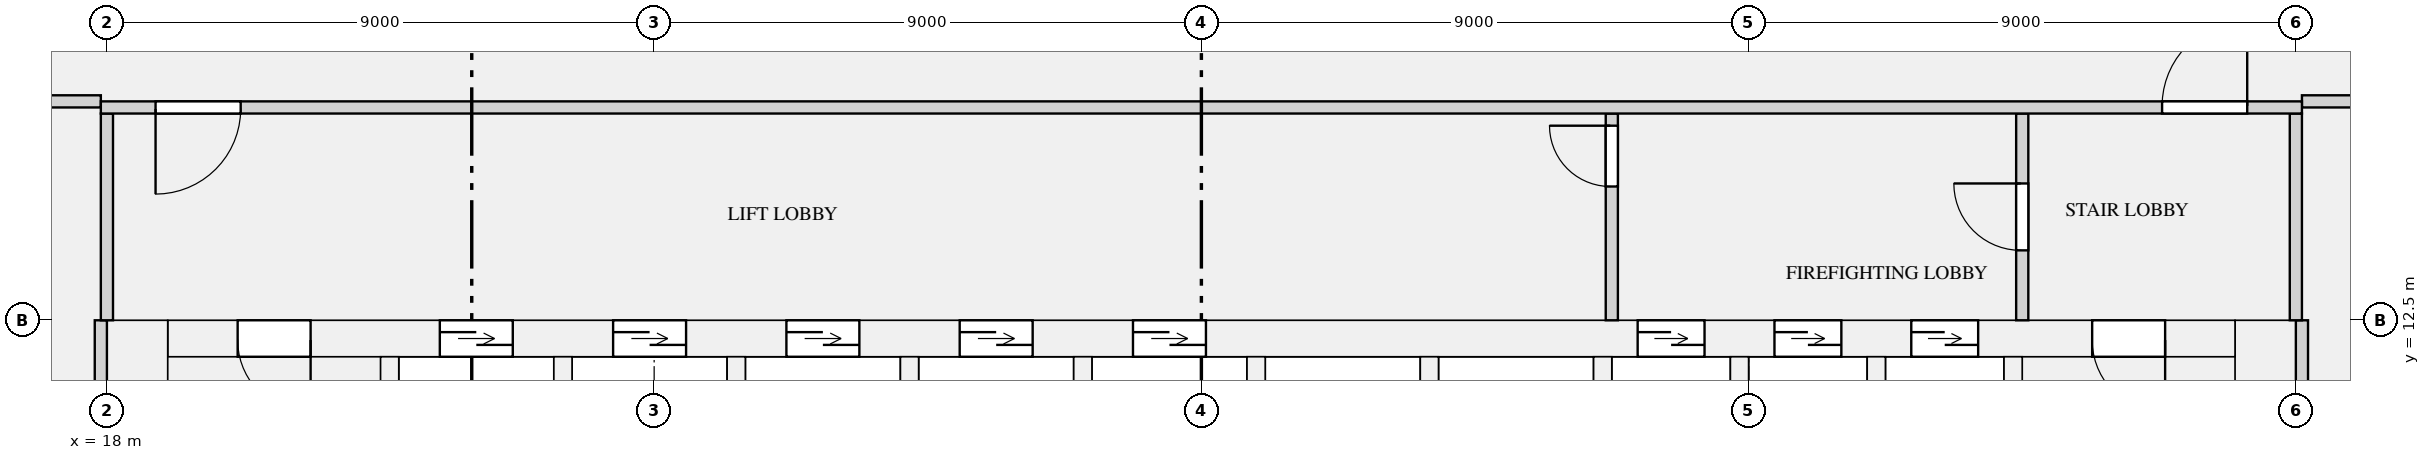
"""IFC4 building model, lengths in metres.
Left out: names, types, materials, properties, quantities, classifications, styles, units other than length and angle.
Written with IfcOpenShell. Run it as: python <this file> out.ifc"""

import sys

from ifc_helpers import new_model, si_unit, direction, frame, frame_2d, origin, place, context, subcontext, project, spatial, rectangle, extrude, element, fill, save


model = new_model("IFC4")
c1 = context("Model", 3, precision=1e-05, world=origin(), true_north=direction((0.0, 1.0)))
c2 = subcontext(c1, "Body", "Model", "MODEL_VIEW")
j1 = project(units=[si_unit("LENGTHUNIT", "METRE"), si_unit("PLANEANGLEUNIT", "RADIAN")], contexts=[c1])
p1 = place(None, origin())
s1 = spatial("IfcSite", under=j1, at=p1, CompositionType="ELEMENT")
p2 = place(p1, origin())
s2 = spatial("IfcBuilding", under=s1, at=p2, CompositionType="ELEMENT")
p3 = place(p2, frame((0.0, 0.0, 73.05)))
s3 = spatial("IfcBuildingStorey", under=s2, at=p3, CompositionType="ELEMENT", Elevation=73.05)
for number, where, z_axis, x_axis in (
    (1, (18.5, 0.0, 0.0), (0.0, 0.0, 1.0), (0.0, 1.0, 0.0)),
    (2, (53.5, 0.0, 0.0), (0.0, 0.0, 1.0), (0.0, 1.0, 0.0)),
):
    element("IfcWall", number, at=place(p3, frame(where, z_axis=z_axis, x_axis=x_axis)), inside=s3, PredefinedType="SHEAR", context=c2, shape_type="SweptSolid", body=[
        extrude(rectangle(XDim=12.5, YDim=1.0, at=frame_2d((6.25, 0.0))), origin(), (0.0, 0.0, 1.0), 4.2),
    ])
p4 = place(p3, frame((19.0, 12.2, 0.0), z_axis=(0.0, 0.0, 1.0), x_axis=(1.0, 0.0, 0.0)))
e3 = element("IfcWall", 3, at=p4, inside=s3, PredefinedType="SHEAR", context=c2, shape_type="SweptSolid", body=[
    extrude(rectangle(XDim=34.0, YDim=0.6, at=frame_2d((17.0, 0.0))), origin(), (0.0, 0.0, 1.0), 4.2),
])
p5 = place(p4, frame((4.475, 0.0, 0.0)))
e4 = element("IfcOpeningElement", 4, at=p5, cuts=e3, PredefinedType="OPENING", context=c2, shape_type="SweptSolid", body=[
    extrude(rectangle(XDim=1.2, YDim=2.1, at=frame_2d((0.6, 1.05))), frame((0.0, 0.31, 0.0), z_axis=(0.0, -1.0, 0.0), x_axis=(1.0, 0.0, 0.0)), (0.0, 0.0, 1.0), 0.62),
])
p6 = place(p4, frame((7.325, 0.0, 0.0)))
e5 = element("IfcOpeningElement", 5, at=p6, cuts=e3, PredefinedType="OPENING", context=c2, shape_type="SweptSolid", body=[
    extrude(rectangle(XDim=1.2, YDim=2.1, at=frame_2d((0.6, 1.05))), frame((0.0, 0.31, 0.0), z_axis=(0.0, -1.0, 0.0), x_axis=(1.0, 0.0, 0.0)), (0.0, 0.0, 1.0), 0.62),
])
p7 = place(p4, frame((10.175, 0.0, 0.0)))
e6 = element("IfcOpeningElement", 6, at=p7, cuts=e3, PredefinedType="OPENING", context=c2, shape_type="SweptSolid", body=[
    extrude(rectangle(XDim=1.2, YDim=2.1, at=frame_2d((0.6, 1.05))), frame((0.0, 0.31, 0.0), z_axis=(0.0, -1.0, 0.0), x_axis=(1.0, 0.0, 0.0)), (0.0, 0.0, 1.0), 0.62),
])
p8 = place(p4, frame((13.025, 0.0, 0.0)))
e7 = element("IfcOpeningElement", 7, at=p8, cuts=e3, PredefinedType="OPENING", context=c2, shape_type="SweptSolid", body=[
    extrude(rectangle(XDim=1.2, YDim=2.1, at=frame_2d((0.6, 1.05))), frame((0.0, 0.31, 0.0), z_axis=(0.0, -1.0, 0.0), x_axis=(1.0, 0.0, 0.0)), (0.0, 0.0, 1.0), 0.62),
])
p9 = place(p4, frame((15.875, 0.0, 0.0)))
e8 = element("IfcOpeningElement", 8, at=p9, cuts=e3, PredefinedType="OPENING", context=c2, shape_type="SweptSolid", body=[
    extrude(rectangle(XDim=1.2, YDim=2.1, at=frame_2d((0.6, 1.05))), frame((0.0, 0.31, 0.0), z_axis=(0.0, -1.0, 0.0), x_axis=(1.0, 0.0, 0.0)), (0.0, 0.0, 1.0), 0.62),
])
p10 = place(p4, frame((24.175, 0.0, 0.0)))
e9 = element("IfcOpeningElement", 9, at=p10, cuts=e3, PredefinedType="OPENING", context=c2, shape_type="SweptSolid", body=[
    extrude(rectangle(XDim=1.1, YDim=2.1, at=frame_2d((0.55, 1.05))), frame((0.0, 0.31, 0.0), z_axis=(0.0, -1.0, 0.0), x_axis=(1.0, 0.0, 0.0)), (0.0, 0.0, 1.0), 0.62),
])
p11 = place(p4, frame((26.425, 0.0, 0.0)))
e10 = element("IfcOpeningElement", 10, at=p11, cuts=e3, PredefinedType="OPENING", context=c2, shape_type="SweptSolid", body=[
    extrude(rectangle(XDim=1.1, YDim=2.1, at=frame_2d((0.55, 1.05))), frame((0.0, 0.31, 0.0), z_axis=(0.0, -1.0, 0.0), x_axis=(1.0, 0.0, 0.0)), (0.0, 0.0, 1.0), 0.62),
])
p12 = place(p4, frame((28.675, 0.0, 0.0)))
e11 = element("IfcOpeningElement", 11, at=p12, cuts=e3, PredefinedType="OPENING", context=c2, shape_type="SweptSolid", body=[
    extrude(rectangle(XDim=1.1, YDim=2.1, at=frame_2d((0.55, 1.05))), frame((0.0, 0.31, 0.0), z_axis=(0.0, -1.0, 0.0), x_axis=(1.0, 0.0, 0.0)), (0.0, 0.0, 1.0), 0.62),
])
p13 = place(p4, frame((1.15, 0.0, 0.0)))
e12 = element("IfcOpeningElement", 12, at=p13, cuts=e3, PredefinedType="OPENING", context=c2, shape_type="SweptSolid", body=[
    extrude(rectangle(XDim=1.2, YDim=2.1, at=frame_2d((0.6, 1.05))), frame((0.0, 0.31, 0.0), z_axis=(0.0, -1.0, 0.0), x_axis=(1.0, 0.0, 0.0)), (0.0, 0.0, 1.0), 0.62),
])
p14 = place(p4, frame((31.65, 0.0, 0.0)))
e13 = element("IfcOpeningElement", 13, at=p14, cuts=e3, PredefinedType="OPENING", context=c2, shape_type="SweptSolid", body=[
    extrude(rectangle(XDim=1.2, YDim=2.1, at=frame_2d((0.6, 1.05))), frame((0.0, 0.31, 0.0), z_axis=(0.0, -1.0, 0.0), x_axis=(1.0, 0.0, 0.0)), (0.0, 0.0, 1.0), 0.62),
])
for number, where, z_axis, x_axis in (
    (14, (22.65, 9.35, 0.0), (0.0, 0.0, 1.0), (0.0, 1.0, 0.0)),
    (15, (25.5, 9.35, 0.0), (0.0, 0.0, 1.0), (0.0, 1.0, 0.0)),
    (16, (28.35, 9.35, 0.0), (0.0, 0.0, 1.0), (0.0, 1.0, 0.0)),
    (17, (31.2, 9.35, 0.0), (0.0, 0.0, 1.0), (0.0, 1.0, 0.0)),
    (18, (34.05, 9.35, 0.0), (0.0, 0.0, 1.0), (0.0, 1.0, 0.0)),
    (19, (36.9, 9.35, 0.0), (0.0, 0.0, 1.0), (0.0, 1.0, 0.0)),
    (20, (39.75, 9.35, 0.0), (0.0, 0.0, 1.0), (0.0, 1.0, 0.0)),
):
    element("IfcWall", number, at=place(p3, frame(where, z_axis=z_axis, x_axis=x_axis)), inside=s3, PredefinedType="SHEAR", context=c2, shape_type="SweptSolid", body=[
        extrude(rectangle(XDim=2.55, YDim=0.3, at=frame_2d((1.275, 0.0))), origin(), (0.0, 0.0, 1.0), 4.2),
    ])
for number, where, z_axis, x_axis in (
    (21, (42.6, 8.25, 0.0), (0.0, 0.0, 1.0), (0.0, 1.0, 0.0)),
    (22, (44.85, 8.25, 0.0), (0.0, 0.0, 1.0), (0.0, 1.0, 0.0)),
    (23, (47.1, 8.25, 0.0), (0.0, 0.0, 1.0), (0.0, 1.0, 0.0)),
    (24, (49.35, 8.25, 0.0), (0.0, 0.0, 1.0), (0.0, 1.0, 0.0)),
):
    element("IfcWall", number, at=place(p3, frame(where, z_axis=z_axis, x_axis=x_axis)), inside=s3, PredefinedType="SHEAR", context=c2, shape_type="SweptSolid", body=[
        extrude(rectangle(XDim=3.65, YDim=0.3, at=frame_2d((1.825, 0.0))), origin(), (0.0, 0.0, 1.0), 4.2),
    ])
p15 = place(p3, frame((18.0, 12.5, 0.0), z_axis=(0.0, 0.0, 1.0), x_axis=(0.0, 1.0, 0.0)))
e25 = element("IfcWall", 25, at=p15, inside=s3, PredefinedType="PARTITIONING", context=c2, shape_type="SweptSolid", body=[
    extrude(rectangle(XDim=3.4, YDim=0.2, at=frame_2d((1.7, 0.0))), origin(), (0.0, 0.0, 1.0), 3.7),
])
p16 = place(p3, frame((42.75, 12.5, 0.0), z_axis=(0.0, 0.0, 1.0), x_axis=(0.0, 1.0, 0.0)))
e26 = element("IfcWall", 26, at=p16, inside=s3, PredefinedType="PARTITIONING", context=c2, shape_type="SweptSolid", body=[
    extrude(rectangle(XDim=3.4, YDim=0.2, at=frame_2d((1.7, 0.0))), origin(), (0.0, 0.0, 1.0), 3.7),
])
p17 = place(p16, frame((2.2, 0.0, 0.0)))
e27 = element("IfcOpeningElement", 27, at=p17, cuts=e26, PredefinedType="OPENING", context=c2, shape_type="SweptSolid", body=[
    extrude(rectangle(XDim=1.0, YDim=2.1, at=frame_2d((0.5, 1.05))), frame((0.0, 0.11, 0.0), z_axis=(0.0, -1.0, 0.0), x_axis=(1.0, 0.0, 0.0)), (0.0, 0.0, 1.0), 0.22),
])
p18 = place(p3, frame((49.5, 12.5, 0.0), z_axis=(0.0, 0.0, 1.0), x_axis=(0.0, 1.0, 0.0)))
e28 = element("IfcWall", 28, at=p18, inside=s3, PredefinedType="PARTITIONING", context=c2, shape_type="SweptSolid", body=[
    extrude(rectangle(XDim=3.4, YDim=0.2, at=frame_2d((1.7, 0.0))), origin(), (0.0, 0.0, 1.0), 3.7),
])
p19 = place(p18, frame((1.15, 0.0, 0.0)))
e29 = element("IfcOpeningElement", 29, at=p19, cuts=e28, PredefinedType="OPENING", context=c2, shape_type="SweptSolid", body=[
    extrude(rectangle(XDim=1.1, YDim=2.1, at=frame_2d((0.55, 1.05))), frame((0.0, 0.11, 0.0), z_axis=(0.0, -1.0, 0.0), x_axis=(1.0, 0.0, 0.0)), (0.0, 0.0, 1.0), 0.22),
])
p20 = place(p3, frame((54.0, 12.5, 0.0), z_axis=(0.0, 0.0, 1.0), x_axis=(0.0, 1.0, 0.0)))
e30 = element("IfcWall", 30, at=p20, inside=s3, PredefinedType="PARTITIONING", context=c2, shape_type="SweptSolid", body=[
    extrude(rectangle(XDim=3.4, YDim=0.2, at=frame_2d((1.7, 0.0))), origin(), (0.0, 0.0, 1.0), 3.7),
])
p21 = place(p3, frame((17.9, 16.0, 0.0), z_axis=(0.0, 0.0, 1.0), x_axis=(1.0, 0.0, 0.0)))
e31 = element("IfcWall", 31, at=p21, inside=s3, PredefinedType="PARTITIONING", context=c2, shape_type="SweptSolid", body=[
    extrude(rectangle(XDim=36.2, YDim=0.2, at=frame_2d((18.1, 0.0))), origin(), (0.0, 0.0, 1.0), 3.7),
])
p22 = place(p21, frame((0.9, 0.0, 0.0)))
e32 = element("IfcOpeningElement", 32, at=p22, cuts=e31, PredefinedType="OPENING", context=c2, shape_type="SweptSolid", body=[
    extrude(rectangle(XDim=1.4, YDim=2.1, at=frame_2d((0.7, 1.05))), frame((0.0, 0.11, 0.0), z_axis=(0.0, -1.0, 0.0), x_axis=(1.0, 0.0, 0.0)), (0.0, 0.0, 1.0), 0.22),
])
p23 = place(p21, frame((33.9, 0.0, 0.0)))
e33 = element("IfcOpeningElement", 33, at=p23, cuts=e31, PredefinedType="OPENING", context=c2, shape_type="SweptSolid", body=[
    extrude(rectangle(XDim=1.4, YDim=2.1, at=frame_2d((0.7, 1.05))), frame((0.0, 0.11, 0.0), z_axis=(0.0, -1.0, 0.0), x_axis=(1.0, 0.0, 0.0)), (0.0, 0.0, 1.0), 0.22),
])
p24 = place(p3, frame((5.592, 16.1, 0.0), z_axis=(0.0, 0.0, 1.0), x_axis=(1.0, 0.0, 0.0)))
e34 = element("IfcWall", 34, at=p24, inside=s3, PredefinedType="PARTITIONING", context=c2, shape_type="SweptSolid", body=[
    extrude(rectangle(XDim=12.308, YDim=0.2, at=frame_2d((6.154, 0.0))), origin(), (0.0, 0.0, 1.0), 3.7),
])
p25 = place(p24, frame((3.308, 0.0, 0.0)))
e35 = element("IfcOpeningElement", 35, at=p25, cuts=e34, PredefinedType="OPENING", context=c2, shape_type="SweptSolid", body=[
    extrude(rectangle(XDim=1.2, YDim=2.1, at=frame_2d((0.6, 1.05))), frame((0.0, 0.11, 0.0), z_axis=(0.0, -1.0, 0.0), x_axis=(1.0, 0.0, 0.0)), (0.0, 0.0, 1.0), 0.22),
])
p26 = place(p24, frame((7.708, 0.0, 0.0)))
e36 = element("IfcOpeningElement", 36, at=p26, cuts=e34, PredefinedType="OPENING", context=c2, shape_type="SweptSolid", body=[
    extrude(rectangle(XDim=1.8, YDim=2.1, at=frame_2d((0.9, 1.05))), frame((0.0, 0.11, 0.0), z_axis=(0.0, -1.0, 0.0), x_axis=(1.0, 0.0, 0.0)), (0.0, 0.0, 1.0), 0.22),
])
p27 = place(p3, frame((54.1, 16.1, 0.0), z_axis=(0.0, 0.0, 1.0), x_axis=(1.0, 0.0, 0.0)))
e37 = element("IfcWall", 37, at=p27, inside=s3, PredefinedType="PARTITIONING", context=c2, shape_type="SweptSolid", body=[
    extrude(rectangle(XDim=19.1, YDim=0.2, at=frame_2d((9.55, 0.0))), origin(), (0.0, 0.0, 1.0), 3.7),
])
p28 = place(p27, frame((3.8, 0.0, 0.0)))
e38 = element("IfcOpeningElement", 38, at=p28, cuts=e37, PredefinedType="OPENING", context=c2, shape_type="SweptSolid", body=[
    extrude(rectangle(XDim=1.8, YDim=2.1, at=frame_2d((0.9, 1.05))), frame((0.0, 0.11, 0.0), z_axis=(0.0, -1.0, 0.0), x_axis=(1.0, 0.0, 0.0)), (0.0, 0.0, 1.0), 0.22),
])
p29 = place(p27, frame((11.5, 0.0, 0.0)))
e39 = element("IfcOpeningElement", 39, at=p29, cuts=e37, PredefinedType="OPENING", context=c2, shape_type="SweptSolid", body=[
    extrude(rectangle(XDim=1.8, YDim=2.1, at=frame_2d((0.9, 1.05))), frame((0.0, 0.11, 0.0), z_axis=(0.0, -1.0, 0.0), x_axis=(1.0, 0.0, 0.0)), (0.0, 0.0, 1.0), 0.22),
])
p30 = place(p27, frame((16.35, 0.0, 0.0)))
e40 = element("IfcOpeningElement", 40, at=p30, cuts=e37, PredefinedType="OPENING", context=c2, shape_type="SweptSolid", body=[
    extrude(rectangle(XDim=1.8, YDim=2.1, at=frame_2d((0.9, 1.05))), frame((0.0, 0.11, 0.0), z_axis=(0.0, -1.0, 0.0), x_axis=(1.0, 0.0, 0.0)), (0.0, 0.0, 1.0), 0.22),
])
for number, where, z_axis, x_axis in (
    (41, (17.9, 0.8, 0.0), (0.0, 0.0, 1.0), (0.0, 1.0, 0.0)),
    (42, (54.1, 0.8, 0.0), (0.0, 0.0, 1.0), (0.0, 1.0, 0.0)),
):
    element("IfcWall", number, at=place(p3, frame(where, z_axis=z_axis, x_axis=x_axis)), inside=s3, PredefinedType="PARTITIONING", context=c2, shape_type="SweptSolid", body=[
        extrude(rectangle(XDim=11.7, YDim=0.2, at=frame_2d((5.85, 0.0))), origin(), (0.0, 0.0, 1.0), 3.7),
    ])
p31 = place(p5, origin())
e43 = element("IfcDoor", 43, at=p31, inside=s3, OperationType="DOUBLE_DOOR_SLIDING", PredefinedType="DOOR", context=c2, shape_type="SweptSolid", body=[
    extrude(rectangle(XDim=1.2, YDim=2.1, at=frame_2d((0.6, 1.05))), frame((0.0, 0.025, 0.0), z_axis=(0.0, -1.0, 0.0), x_axis=(1.0, 0.0, 0.0)), (0.0, 0.0, 1.0), 0.05),
])
fill(e4, e43)
p32 = place(p6, origin())
e44 = element("IfcDoor", 44, at=p32, inside=s3, OperationType="DOUBLE_DOOR_SLIDING", PredefinedType="DOOR", context=c2, shape_type="SweptSolid", body=[
    extrude(rectangle(XDim=1.2, YDim=2.1, at=frame_2d((0.6, 1.05))), frame((0.0, 0.025, 0.0), z_axis=(0.0, -1.0, 0.0), x_axis=(1.0, 0.0, 0.0)), (0.0, 0.0, 1.0), 0.05),
])
fill(e5, e44)
p33 = place(p7, origin())
e45 = element("IfcDoor", 45, at=p33, inside=s3, OperationType="DOUBLE_DOOR_SLIDING", PredefinedType="DOOR", context=c2, shape_type="SweptSolid", body=[
    extrude(rectangle(XDim=1.2, YDim=2.1, at=frame_2d((0.6, 1.05))), frame((0.0, 0.025, 0.0), z_axis=(0.0, -1.0, 0.0), x_axis=(1.0, 0.0, 0.0)), (0.0, 0.0, 1.0), 0.05),
])
fill(e6, e45)
p34 = place(p8, origin())
e46 = element("IfcDoor", 46, at=p34, inside=s3, OperationType="DOUBLE_DOOR_SLIDING", PredefinedType="DOOR", context=c2, shape_type="SweptSolid", body=[
    extrude(rectangle(XDim=1.2, YDim=2.1, at=frame_2d((0.6, 1.05))), frame((0.0, 0.025, 0.0), z_axis=(0.0, -1.0, 0.0), x_axis=(1.0, 0.0, 0.0)), (0.0, 0.0, 1.0), 0.05),
])
fill(e7, e46)
p35 = place(p9, origin())
e47 = element("IfcDoor", 47, at=p35, inside=s3, OperationType="DOUBLE_DOOR_SLIDING", PredefinedType="DOOR", context=c2, shape_type="SweptSolid", body=[
    extrude(rectangle(XDim=1.2, YDim=2.1, at=frame_2d((0.6, 1.05))), frame((0.0, 0.025, 0.0), z_axis=(0.0, -1.0, 0.0), x_axis=(1.0, 0.0, 0.0)), (0.0, 0.0, 1.0), 0.05),
])
fill(e8, e47)
p36 = place(p10, origin())
e48 = element("IfcDoor", 48, at=p36, inside=s3, OperationType="DOUBLE_DOOR_SLIDING", PredefinedType="DOOR", context=c2, shape_type="SweptSolid", body=[
    extrude(rectangle(XDim=1.1, YDim=2.1, at=frame_2d((0.55, 1.05))), frame((0.0, 0.025, 0.0), z_axis=(0.0, -1.0, 0.0), x_axis=(1.0, 0.0, 0.0)), (0.0, 0.0, 1.0), 0.05),
])
fill(e9, e48)
p37 = place(p11, origin())
e49 = element("IfcDoor", 49, at=p37, inside=s3, OperationType="DOUBLE_DOOR_SLIDING", PredefinedType="DOOR", context=c2, shape_type="SweptSolid", body=[
    extrude(rectangle(XDim=1.1, YDim=2.1, at=frame_2d((0.55, 1.05))), frame((0.0, 0.025, 0.0), z_axis=(0.0, -1.0, 0.0), x_axis=(1.0, 0.0, 0.0)), (0.0, 0.0, 1.0), 0.05),
])
fill(e10, e49)
p38 = place(p12, origin())
e50 = element("IfcDoor", 50, at=p38, inside=s3, OperationType="DOUBLE_DOOR_SLIDING", PredefinedType="DOOR", context=c2, shape_type="SweptSolid", body=[
    extrude(rectangle(XDim=1.1, YDim=2.1, at=frame_2d((0.55, 1.05))), frame((0.0, 0.025, 0.0), z_axis=(0.0, -1.0, 0.0), x_axis=(1.0, 0.0, 0.0)), (0.0, 0.0, 1.0), 0.05),
])
fill(e11, e50)
p39 = place(p13, frame((1.2, 0.0, 0.0), z_axis=(0.0, 0.0, 1.0), x_axis=(-1.0, 0.0, 0.0)))
e51 = element("IfcDoor", 51, at=p39, inside=s3, OperationType="SINGLE_SWING_LEFT", PredefinedType="DOOR", context=c2, shape_type="SweptSolid", body=[
    extrude(rectangle(XDim=1.2, YDim=2.1, at=frame_2d((0.6, 1.05))), frame((0.0, 0.025, 0.0), z_axis=(0.0, -1.0, 0.0), x_axis=(1.0, 0.0, 0.0)), (0.0, 0.0, 1.0), 0.05),
])
fill(e12, e51)
p40 = place(p14, frame((1.2, 0.0, 0.0), z_axis=(0.0, 0.0, 1.0), x_axis=(-1.0, 0.0, 0.0)))
e52 = element("IfcDoor", 52, at=p40, inside=s3, OperationType="SINGLE_SWING_LEFT", PredefinedType="DOOR", context=c2, shape_type="SweptSolid", body=[
    extrude(rectangle(XDim=1.2, YDim=2.1, at=frame_2d((0.6, 1.05))), frame((0.0, 0.025, 0.0), z_axis=(0.0, -1.0, 0.0), x_axis=(1.0, 0.0, 0.0)), (0.0, 0.0, 1.0), 0.05),
])
fill(e13, e52)
p41 = place(p17, origin())
e53 = element("IfcDoor", 53, at=p41, inside=s3, OperationType="SINGLE_SWING_RIGHT", PredefinedType="DOOR", context=c2, shape_type="SweptSolid", body=[
    extrude(rectangle(XDim=1.0, YDim=2.1, at=frame_2d((0.5, 1.05))), frame((0.0, 0.025, 0.0), z_axis=(0.0, -1.0, 0.0), x_axis=(1.0, 0.0, 0.0)), (0.0, 0.0, 1.0), 0.05),
])
fill(e27, e53)
p42 = place(p19, origin())
e54 = element("IfcDoor", 54, at=p42, inside=s3, OperationType="SINGLE_SWING_RIGHT", PredefinedType="DOOR", context=c2, shape_type="SweptSolid", body=[
    extrude(rectangle(XDim=1.1, YDim=2.1, at=frame_2d((0.55, 1.05))), frame((0.0, 0.025, 0.0), z_axis=(0.0, -1.0, 0.0), x_axis=(1.0, 0.0, 0.0)), (0.0, 0.0, 1.0), 0.05),
])
fill(e29, e54)
p43 = place(p22, frame((1.4, 0.0, 0.0), z_axis=(0.0, 0.0, 1.0), x_axis=(-1.0, 0.0, 0.0)))
e55 = element("IfcDoor", 55, at=p43, inside=s3, OperationType="SINGLE_SWING_RIGHT", PredefinedType="DOOR", context=c2, shape_type="SweptSolid", body=[
    extrude(rectangle(XDim=1.4, YDim=2.1, at=frame_2d((0.7, 1.05))), frame((0.0, 0.025, 0.0), z_axis=(0.0, -1.0, 0.0), x_axis=(1.0, 0.0, 0.0)), (0.0, 0.0, 1.0), 0.05),
])
fill(e32, e55)
p44 = place(p23, origin())
e56 = element("IfcDoor", 56, at=p44, inside=s3, OperationType="SINGLE_SWING_RIGHT", PredefinedType="DOOR", context=c2, shape_type="SweptSolid", body=[
    extrude(rectangle(XDim=1.4, YDim=2.1, at=frame_2d((0.7, 1.05))), frame((0.0, 0.025, 0.0), z_axis=(0.0, -1.0, 0.0), x_axis=(1.0, 0.0, 0.0)), (0.0, 0.0, 1.0), 0.05),
])
fill(e33, e56)
save(model, sys.argv[1])
